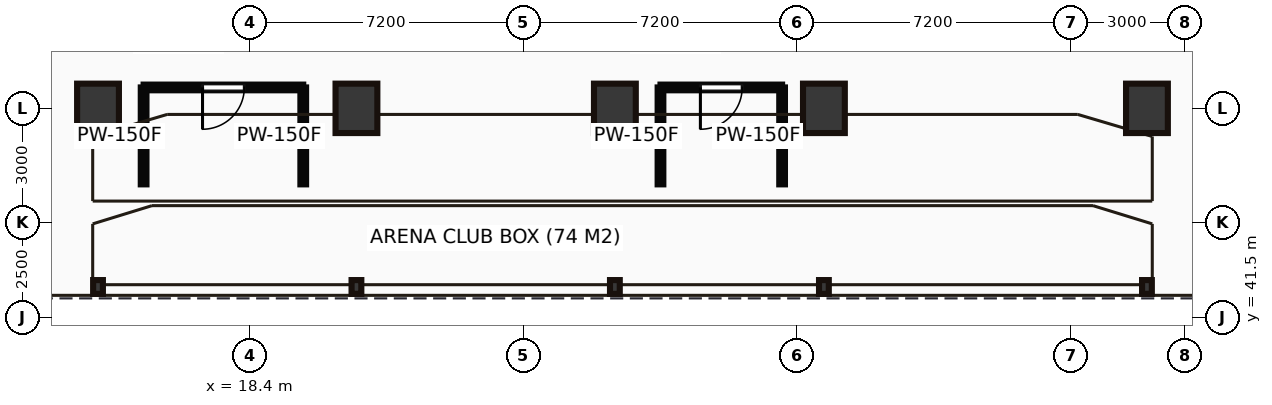
"""IFC4 building model, lengths in metres.
Left out: names, types, materials, properties, quantities, classifications, styles, units other than length and angle.
Written with IfcOpenShell. Run it as: python <this file> out.ifc"""

import sys

from ifc_helpers import new_model, si_unit, direction, frame, frame_2d, origin, origin_2d, place, context, subcontext, project, spatial, rectangle, hollow_rectangle, i_section, extrude, source, transform, mapped, element, fill, save


model = new_model("IFC4")
c1 = context("Model", 3, precision=1e-05, world=origin(), true_north=direction((0.0, 1.0)))
c2 = subcontext(c1, "Body", "Model", "MODEL_VIEW")
j1 = project(units=[si_unit("LENGTHUNIT", "METRE"), si_unit("PLANEANGLEUNIT", "RADIAN")], contexts=[c1])
p1 = place(None, origin())
s1 = spatial("IfcSite", under=j1, at=p1, CompositionType="ELEMENT")
p2 = place(p1, origin())
s2 = spatial("IfcBuilding", under=s1, at=p2, CompositionType="ELEMENT")
p3 = place(p2, frame((0.0, 0.0, 11.0)))
s3 = spatial("IfcBuildingStorey", under=s2, at=p3, CompositionType="ELEMENT", Elevation=11.0)
m1 = source(origin(), c2, "Body", "SweptSolid", [
    extrude(hollow_rectangle(XDim=1.1, YDim=1.3, WallThickness=0.055, at=origin_2d()), origin(), (0.0, 0.0, 1.0), 5.0),
])
for number, where, z_axis, x_axis in (
    (1, (14.4, 47.0, 0.0), (0.0, 0.0, 1.0), (1.0, 0.0, 0.0)),
    (2, (21.2, 47.0, 0.0), (0.0, 0.0, 1.0), (1.0, 0.0, 0.0)),
    (3, (28.0, 47.0, 0.0), (0.0, 0.0, 1.0), (1.0, 0.0, 0.0)),
    (4, (33.5, 47.0, 0.0), (0.0, 0.0, 1.0), (1.0, 0.0, 0.0)),
    (5, (42.0, 47.0, 0.0), (0.0, 0.0, 1.0), (1.0, 0.0, 0.0)),
):
    element("IfcColumn", number, at=place(p3, frame(where, z_axis=z_axis, x_axis=x_axis)), inside=s3, PredefinedType="PILASTER", context=c2, shape_type="MappedRepresentation", body=[
        mapped(m1, transform((0.0, 0.0, 0.0))),
    ])
m2 = source(origin(), c2, "Body", "SweptSolid", [
    extrude(i_section(OverallWidth=0.257, OverallDepth=0.363, WebThickness=0.013, FlangeThickness=0.022, at=origin_2d()), origin(), (0.0, 0.0, 1.0), 5.0),
])
for number, where, z_axis, x_axis in (
    (6, (14.4, 42.3, 0.0), (0.0, 0.0, 1.0), (1.0, 0.0, 0.0)),
    (7, (21.2, 42.3, 0.0), (0.0, 0.0, 1.0), (1.0, 0.0, 0.0)),
    (8, (28.0, 42.3, 0.0), (0.0, 0.0, 1.0), (1.0, 0.0, 0.0)),
    (9, (33.5, 42.3, 0.0), (0.0, 0.0, 1.0), (1.0, 0.0, 0.0)),
    (10, (42.0, 42.3, 0.0), (0.0, 0.0, 1.0), (1.0, 0.0, 0.0)),
):
    element("IfcColumn", number, at=place(p3, frame(where, z_axis=z_axis, x_axis=x_axis)), inside=s3, PredefinedType="COLUMN", context=c2, shape_type="MappedRepresentation", body=[
        mapped(m2, transform((0.0, 0.0, 0.0))),
    ])
m3 = source(origin(), c2, "Body", "SweptSolid", [
    extrude(rectangle(XDim=2.55, YDim=0.15, at=frame_2d((1.275, 0.0))), origin(), (0.0, 0.0, 1.0), 4.7),
])
for number, where, z_axis, x_axis in (
    (11, (15.6, 45.0, 0.0), (0.0, 0.0, 1.0), (0.0, 1.0, 0.0)),
    (12, (19.8, 45.0, 0.0), (0.0, 0.0, 1.0), (0.0, 1.0, 0.0)),
):
    element("IfcWall", number, at=place(p3, frame(where, z_axis=z_axis, x_axis=x_axis)), inside=s3, PredefinedType="PARTITIONING", context=c2, shape_type="MappedRepresentation", body=[
        mapped(m3, transform((0.0, 0.0, 0.0))),
    ])
m4 = source(origin(), c2, "Body", "SweptSolid", [
    extrude(rectangle(XDim=4.2, YDim=0.15, at=frame_2d((2.1, 0.0))), origin(), (0.0, 0.0, 1.0), 4.7),
])
p4 = place(p3, frame((15.6, 47.55, 0.0), z_axis=(0.0, 0.0, 1.0), x_axis=(1.0, 0.0, 0.0)))
e13 = element("IfcWall", 13, at=p4, inside=s3, PredefinedType="PARTITIONING", context=c2, shape_type="MappedRepresentation", body=[
    mapped(m4, transform((0.0, 0.0, 0.0))),
])
p5 = place(p4, frame((1.55, 0.0, 0.0)))
e14 = element("IfcOpeningElement", 14, at=p5, cuts=e13, PredefinedType="OPENING", context=c2, shape_type="SweptSolid", body=[
    extrude(rectangle(XDim=1.1, YDim=2.15, at=frame_2d((0.55, 1.075))), frame((0.0, 0.085, 0.0), z_axis=(0.0, -1.0, 0.0), x_axis=(1.0, 0.0, 0.0)), (0.0, 0.0, 1.0), 0.17),
])
for number, where, z_axis, x_axis in (
    (15, (29.2, 45.0, 0.0), (0.0, 0.0, 1.0), (0.0, 1.0, 0.0)),
    (16, (32.4, 45.0, 0.0), (0.0, 0.0, 1.0), (0.0, 1.0, 0.0)),
):
    element("IfcWall", number, at=place(p3, frame(where, z_axis=z_axis, x_axis=x_axis)), inside=s3, PredefinedType="PARTITIONING", context=c2, shape_type="MappedRepresentation", body=[
        mapped(m3, transform((0.0, 0.0, 0.0))),
    ])
m5 = source(origin(), c2, "Body", "SweptSolid", [
    extrude(rectangle(XDim=3.2, YDim=0.15, at=frame_2d((1.6, 0.0))), origin(), (0.0, 0.0, 1.0), 4.7),
])
p6 = place(p3, frame((29.2, 47.55, 0.0), z_axis=(0.0, 0.0, 1.0), x_axis=(1.0, 0.0, 0.0)))
e17 = element("IfcWall", 17, at=p6, inside=s3, PredefinedType="PARTITIONING", context=c2, shape_type="MappedRepresentation", body=[
    mapped(m5, transform((0.0, 0.0, 0.0))),
])
p7 = place(p6, frame((1.05, 0.0, 0.0)))
e18 = element("IfcOpeningElement", 18, at=p7, cuts=e17, PredefinedType="OPENING", context=c2, shape_type="SweptSolid", body=[
    extrude(rectangle(XDim=1.1, YDim=2.15, at=frame_2d((0.55, 1.075))), frame((0.0, 0.085, 0.0), z_axis=(0.0, -1.0, 0.0), x_axis=(1.0, 0.0, 0.0)), (0.0, 0.0, 1.0), 0.17),
])
m6 = source(origin(), c2, "Body", "SweptSolid", [
    extrude(rectangle(XDim=1.1, YDim=2.15, at=frame_2d((0.55, 1.075))), frame((0.0, 0.025, 0.0), z_axis=(0.0, -1.0, 0.0), x_axis=(1.0, 0.0, 0.0)), (0.0, 0.0, 1.0), 0.05),
])
p8 = place(p5, frame((1.1, 0.0, 0.0), z_axis=(0.0, 0.0, 1.0), x_axis=(-1.0, 0.0, 0.0)))
e19 = element("IfcDoor", 19, at=p8, inside=s3, OperationType="SINGLE_SWING_LEFT", PredefinedType="DOOR", context=c2, shape_type="MappedRepresentation", body=[
    mapped(m6, transform((0.0, 0.0, 0.0))),
])
fill(e14, e19)
p9 = place(p7, frame((1.1, 0.0, 0.0), z_axis=(0.0, 0.0, 1.0), x_axis=(-1.0, 0.0, 0.0)))
e20 = element("IfcDoor", 20, at=p9, inside=s3, OperationType="SINGLE_SWING_LEFT", PredefinedType="DOOR", context=c2, shape_type="MappedRepresentation", body=[
    mapped(m6, transform((0.0, 0.0, 0.0))),
])
fill(e18, e20)
save(model, sys.argv[1])
